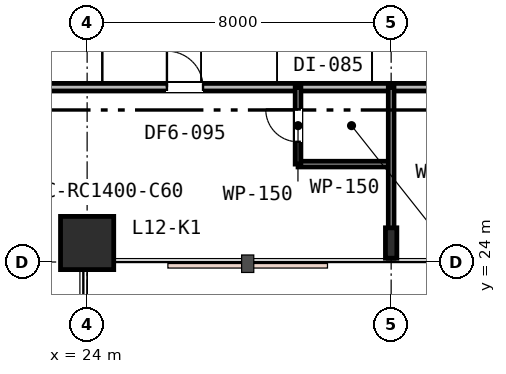
"""IFC4 building model, lengths in metres.
Left out: names, types, materials, properties, quantities, classifications, styles, units other than length and angle.
Written with IfcOpenShell. Run it as: python <this file> out.ifc"""

import sys

from ifc_helpers import new_model, si_unit, direction, frame, frame_2d, origin, origin_2d, place, context, subcontext, project, spatial, rectangle, i_section, extrude, element, fill, save


model = new_model("IFC4")
c1 = context("Model", 3, precision=1e-05, world=origin(), true_north=direction((0.0, 1.0)))
c2 = subcontext(c1, "Body", "Model", "MODEL_VIEW")
j1 = project(units=[si_unit("LENGTHUNIT", "METRE"), si_unit("PLANEANGLEUNIT", "RADIAN")], contexts=[c1])
p1 = place(None, origin())
s1 = spatial("IfcSite", under=j1, at=p1, CompositionType="ELEMENT")
p2 = place(p1, origin())
s2 = spatial("IfcBuilding", under=s1, at=p2, CompositionType="ELEMENT")
p3 = place(p2, frame((0.0, 0.0, 51.0)))
s3 = spatial("IfcBuildingStorey", under=s2, at=p3, CompositionType="ELEMENT", Elevation=51.0)
p4 = place(p3, frame((24.0, 24.5, 0.0), z_axis=(0.0, 0.0, 1.0), x_axis=(1.0, 0.0, 0.0)))
e1 = element("IfcColumn", 1, at=p4, inside=s3, PredefinedType="COLUMN", context=c2, shape_type="SweptSolid", body=[
    extrude(rectangle(XDim=1.4, YDim=1.4, at=origin_2d()), origin(), (0.0, 0.0, 1.0), 3.6),
])
p5 = place(p3, frame((32.0, 24.5, 0.0), z_axis=(0.0, 0.0, 1.0), x_axis=(1.0, 0.0, 0.0)))
e2 = element("IfcColumn", 2, at=p5, inside=s3, PredefinedType="COLUMN", context=c2, shape_type="SweptSolid", body=[
    extrude(i_section(OverallWidth=0.3, OverallDepth=0.8, WebThickness=0.018, FlangeThickness=0.033, FilletRadius=0.03, at=origin_2d()), origin(), (0.0, 0.0, 1.0), 3.6),
])
p6 = place(p3, frame((21.8, 28.6, 0.0), z_axis=(0.0, 0.0, 1.0), x_axis=(1.0, 0.0, 0.0)))
e3 = element("IfcWall", 3, at=p6, inside=s3, PredefinedType="PARTITIONING", context=c2, shape_type="SweptSolid", body=[
    extrude(rectangle(XDim=28.6, YDim=0.2, at=frame_2d((14.3, 0.0))), origin(), (0.0, 0.0, 1.0), 2.82),
])
p7 = place(p6, frame((4.3, 0.0, 0.0)))
e4 = element("IfcOpeningElement", 4, at=p7, cuts=e3, PredefinedType="OPENING", context=c2, shape_type="SweptSolid", body=[
    extrude(rectangle(XDim=0.95, YDim=2.15, at=frame_2d((0.475, 1.075))), frame((0.0, 0.11, 0.0), z_axis=(0.0, -1.0, 0.0), x_axis=(1.0, 0.0, 0.0)), (0.0, 0.0, 1.0), 0.22),
])
p8 = place(p6, frame((12.075, 0.0, 0.0)))
e5 = element("IfcOpeningElement", 5, at=p8, cuts=e3, PredefinedType="OPENING", context=c2, shape_type="SweptSolid", body=[
    extrude(rectangle(XDim=0.95, YDim=2.15, at=frame_2d((0.475, 1.075))), frame((0.0, 0.11, 0.0), z_axis=(0.0, -1.0, 0.0), x_axis=(1.0, 0.0, 0.0)), (0.0, 0.0, 1.0), 0.22),
])
p9 = place(p6, frame((20.186, 0.0, 0.0)))
e6 = element("IfcOpeningElement", 6, at=p9, cuts=e3, PredefinedType="OPENING", context=c2, shape_type="SweptSolid", body=[
    extrude(rectangle(XDim=0.95, YDim=2.15, at=frame_2d((0.475, 1.075))), frame((0.0, 0.11, 0.0), z_axis=(0.0, -1.0, 0.0), x_axis=(1.0, 0.0, 0.0)), (0.0, 0.0, 1.0), 0.22),
])
p10 = place(p3, frame((29.55, 26.576, 0.0), z_axis=(0.0, 0.0, 1.0), x_axis=(1.0, 0.0, 0.0)))
e7 = element("IfcWall", 7, at=p10, inside=s3, PredefinedType="PARTITIONING", context=c2, shape_type="SweptSolid", body=[
    extrude(rectangle(XDim=2.45, YDim=0.15, at=frame_2d((1.225, 0.0))), origin(), (0.0, 0.0, 1.0), 3.33),
])
p11 = place(p3, frame((29.55, 26.576, 0.0), z_axis=(0.0, 0.0, 1.0), x_axis=(0.0, 1.0, 0.0)))
e8 = element("IfcWall", 8, at=p11, inside=s3, PredefinedType="PARTITIONING", context=c2, shape_type="SweptSolid", body=[
    extrude(rectangle(XDim=2.024, YDim=0.15, at=frame_2d((1.012, 0.0))), origin(), (0.0, 0.0, 1.0), 3.33),
])
p12 = place(p11, frame((0.587, 0.0, 0.0)))
e9 = element("IfcOpeningElement", 9, at=p12, cuts=e8, PredefinedType="OPENING", context=c2, shape_type="SweptSolid", body=[
    extrude(rectangle(XDim=0.85, YDim=2.15, at=frame_2d((0.425, 1.075))), frame((0.0, 0.085, 0.0), z_axis=(0.0, -1.0, 0.0), x_axis=(1.0, 0.0, 0.0)), (0.0, 0.0, 1.0), 0.17),
])
p13 = place(p3, frame((32.0, 28.6, 0.0), z_axis=(0.0, 0.0, 1.0), x_axis=(0.0, -1.0, 0.0)))
e10 = element("IfcWall", 10, at=p13, inside=s3, PredefinedType="PARTITIONING", context=c2, shape_type="SweptSolid", body=[
    extrude(rectangle(XDim=4.5, YDim=0.15, at=frame_2d((2.25, 0.0))), origin(), (0.0, 0.0, 1.0), 2.93),
])
p14 = place(p7, origin())
e11 = element("IfcDoor", 11, at=p14, inside=s3, OperationType="SINGLE_SWING_LEFT", PredefinedType="DOOR", context=c2, shape_type="SweptSolid", body=[
    extrude(rectangle(XDim=0.95, YDim=2.15, at=frame_2d((0.475, 1.075))), frame((0.0, 0.025, 0.0), z_axis=(0.0, -1.0, 0.0), x_axis=(1.0, 0.0, 0.0)), (0.0, 0.0, 1.0), 0.05),
])
fill(e4, e11)
p15 = place(p12, origin())
e12 = element("IfcDoor", 12, at=p15, inside=s3, OperationType="SINGLE_SWING_RIGHT", PredefinedType="DOOR", context=c2, shape_type="SweptSolid", body=[
    extrude(rectangle(XDim=0.85, YDim=2.15, at=frame_2d((0.425, 1.075))), frame((0.0, 0.025, 0.0), z_axis=(0.0, -1.0, 0.0), x_axis=(1.0, 0.0, 0.0)), (0.0, 0.0, 1.0), 0.05),
])
fill(e9, e12)
save(model, sys.argv[1])
